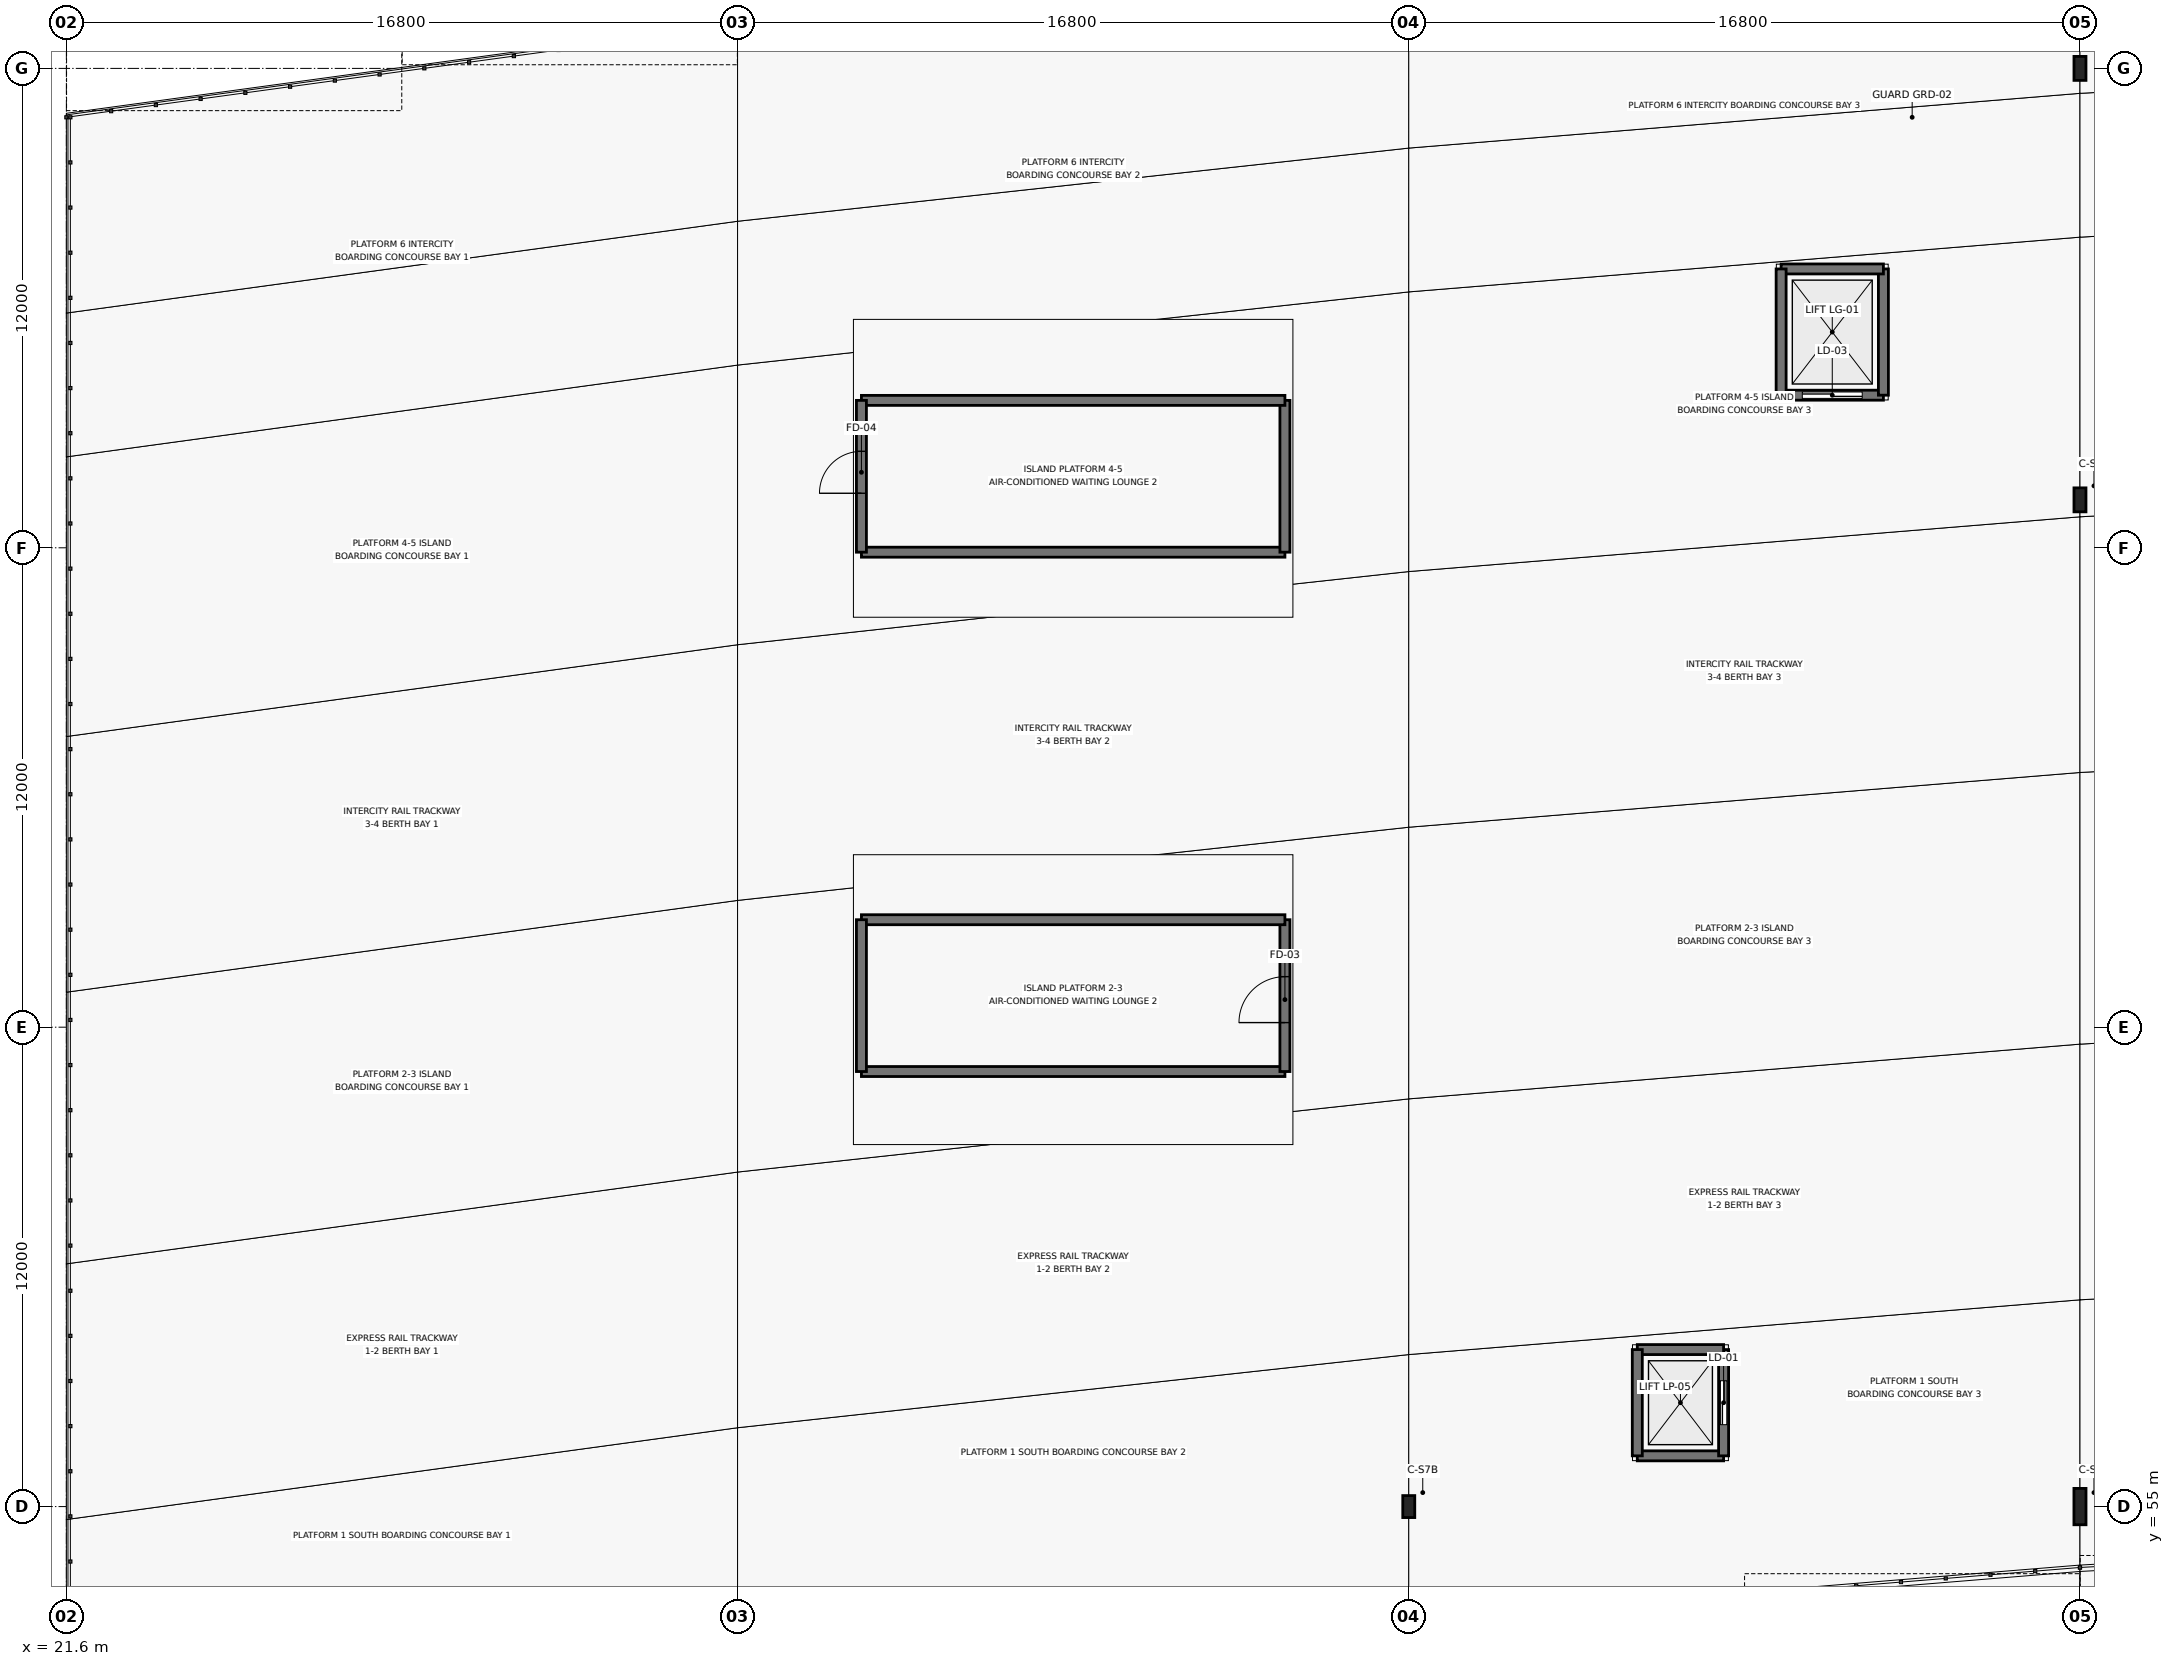
"""IFC4 building model, lengths in metres.
Left out: names, types, materials, properties, quantities, classifications, styles, units other than length and angle.
Written with IfcOpenShell. Run it as: python <this file> out.ifc"""

import sys

from ifc_helpers import new_model, si_unit, direction, frame, frame_2d, origin, origin_2d, place, context, subcontext, project, spatial, rectangle, i_section, extrude, element, fill, save


model = new_model("IFC4")
c1 = context("Model", 3, precision=1e-05, world=origin(), true_north=direction((0.0, 1.0)))
c2 = subcontext(c1, "Body", "Model", "MODEL_VIEW")
j1 = project(units=[si_unit("LENGTHUNIT", "METRE"), si_unit("PLANEANGLEUNIT", "RADIAN")], contexts=[c1])
p1 = place(None, origin())
s1 = spatial("IfcSite", under=j1, at=p1, CompositionType="ELEMENT")
p2 = place(p1, origin())
s2 = spatial("IfcBuilding", under=s1, at=p2, CompositionType="ELEMENT")
p3 = place(p2, frame((0.0, 0.0, 10.8)))
s3 = spatial("IfcBuildingStorey", under=s2, at=p3, CompositionType="ELEMENT", Elevation=10.8)
for number, where, z_axis, x_axis in (
    (1, (72.0, 80.2, 0.0), (0.0, 0.0, 1.0), (1.0, 0.0, 0.0)),
    (2, (72.0, 91.0, 0.0), (0.0, 0.0, 1.0), (1.0, 0.0, 0.0)),
):
    element("IfcColumn", number, at=place(p3, frame(where, z_axis=z_axis, x_axis=x_axis)), inside=s3, PredefinedType="COLUMN", context=c2, shape_type="SweptSolid", body=[
        extrude(i_section(OverallWidth=0.3, OverallDepth=0.6, WebThickness=0.015, FlangeThickness=0.03, FilletRadius=0.027, at=origin_2d()), origin(), (0.0, 0.0, 1.0), 6.0),
    ])
p4 = place(p3, frame((60.92, 56.27, 0.0), z_axis=(0.0, 0.0, 1.0), x_axis=(1.0, 0.0, 0.0)))
e3 = element("IfcWall", 3, at=p4, inside=s3, PredefinedType="SHEAR", context=c2, shape_type="SweptSolid", body=[
    extrude(rectangle(XDim=2.16, YDim=0.25, at=frame_2d((1.08, 0.0))), origin(), (0.0, 0.0, 1.0), 5.37),
])
p5 = place(p3, frame((63.08, 56.27, 0.0), z_axis=(0.0, 0.0, 1.0), x_axis=(0.0, 1.0, 0.0)))
e4 = element("IfcWall", 4, at=p5, inside=s3, PredefinedType="SHEAR", context=c2, shape_type="SweptSolid", body=[
    extrude(rectangle(XDim=2.66, YDim=0.25, at=frame_2d((1.33, 0.0))), origin(), (0.0, 0.0, 1.0), 5.37),
])
p6 = place(p5, frame((0.78, 0.0, 0.0)))
e5 = element("IfcOpeningElement", 5, at=p6, cuts=e4, PredefinedType="OPENING", context=c2, shape_type="SweptSolid", body=[
    extrude(rectangle(XDim=1.1, YDim=2.2, at=frame_2d((0.55, 1.1))), frame((0.0, 0.135, 0.0), z_axis=(0.0, -1.0, 0.0), x_axis=(1.0, 0.0, 0.0)), (0.0, 0.0, 1.0), 0.27),
])
p7 = place(p3, frame((63.08, 58.93, 0.0), z_axis=(0.0, 0.0, 1.0), x_axis=(-1.0, 0.0, 0.0)))
e6 = element("IfcWall", 6, at=p7, inside=s3, PredefinedType="SHEAR", context=c2, shape_type="SweptSolid", body=[
    extrude(rectangle(XDim=2.16, YDim=0.25, at=frame_2d((1.08, 0.0))), origin(), (0.0, 0.0, 1.0), 5.37),
])
p8 = place(p3, frame((60.92, 58.93, 0.0), z_axis=(0.0, 0.0, 1.0), x_axis=(0.0, -1.0, 0.0)))
e7 = element("IfcWall", 7, at=p8, inside=s3, PredefinedType="SHEAR", context=c2, shape_type="SweptSolid", body=[
    extrude(rectangle(XDim=2.66, YDim=0.25, at=frame_2d((1.33, 0.0))), origin(), (0.0, 0.0, 1.0), 5.37),
])
p9 = place(p3, frame((64.52, 82.82, 0.0), z_axis=(0.0, 0.0, 1.0), x_axis=(1.0, 0.0, 0.0)))
e8 = element("IfcWall", 8, at=p9, inside=s3, PredefinedType="SHEAR", context=c2, shape_type="SweptSolid", body=[
    extrude(rectangle(XDim=2.56, YDim=0.25, at=frame_2d((1.28, 0.0))), origin(), (0.0, 0.0, 1.0), 5.37),
])
p10 = place(p9, frame((0.53, 0.0, 0.0)))
e9 = element("IfcOpeningElement", 9, at=p10, cuts=e8, PredefinedType="OPENING", context=c2, shape_type="SweptSolid", body=[
    extrude(rectangle(XDim=1.5, YDim=2.3, at=frame_2d((0.75, 1.15))), frame((0.0, 0.135, 0.0), z_axis=(0.0, -1.0, 0.0), x_axis=(1.0, 0.0, 0.0)), (0.0, 0.0, 1.0), 0.27),
])
p11 = place(p3, frame((67.08, 82.82, 0.0), z_axis=(0.0, 0.0, 1.0), x_axis=(0.0, 1.0, 0.0)))
e10 = element("IfcWall", 10, at=p11, inside=s3, PredefinedType="SHEAR", context=c2, shape_type="SweptSolid", body=[
    extrude(rectangle(XDim=3.16, YDim=0.25, at=frame_2d((1.58, 0.0))), origin(), (0.0, 0.0, 1.0), 5.37),
])
p12 = place(p3, frame((67.08, 85.98, 0.0), z_axis=(0.0, 0.0, 1.0), x_axis=(-1.0, 0.0, 0.0)))
e11 = element("IfcWall", 11, at=p12, inside=s3, PredefinedType="SHEAR", context=c2, shape_type="SweptSolid", body=[
    extrude(rectangle(XDim=2.56, YDim=0.25, at=frame_2d((1.28, 0.0))), origin(), (0.0, 0.0, 1.0), 5.37),
])
p13 = place(p3, frame((64.52, 85.98, 0.0), z_axis=(0.0, 0.0, 1.0), x_axis=(0.0, -1.0, 0.0)))
e12 = element("IfcWall", 12, at=p13, inside=s3, PredefinedType="SHEAR", context=c2, shape_type="SweptSolid", body=[
    extrude(rectangle(XDim=3.16, YDim=0.25, at=frame_2d((1.58, 0.0))), origin(), (0.0, 0.0, 1.0), 5.37),
])
p14 = place(p3, frame((41.5, 65.89, 0.0), z_axis=(0.0, 0.0, 1.0), x_axis=(1.0, 0.0, 0.0)))
e13 = element("IfcWall", 13, at=p14, inside=s3, PredefinedType="SHEAR", context=c2, shape_type="SweptSolid", body=[
    extrude(rectangle(XDim=10.6, YDim=0.25, at=frame_2d((5.3, 0.0))), origin(), (0.0, 0.0, 1.0), 3.4),
])
p15 = place(p3, frame((52.1, 65.89, 0.0), z_axis=(0.0, 0.0, 1.0), x_axis=(0.0, 1.0, 0.0)))
e14 = element("IfcWall", 14, at=p15, inside=s3, PredefinedType="SHEAR", context=c2, shape_type="SweptSolid", body=[
    extrude(rectangle(XDim=3.8, YDim=0.25, at=frame_2d((1.9, 0.0))), origin(), (0.0, 0.0, 1.0), 3.4),
])
p16 = place(p15, frame((1.225, 0.0, 0.0)))
e15 = element("IfcOpeningElement", 15, at=p16, cuts=e14, PredefinedType="OPENING", context=c2, shape_type="SweptSolid", body=[
    extrude(rectangle(XDim=1.15, YDim=2.2, at=frame_2d((0.575, 1.1))), frame((0.0, 0.135, 0.0), z_axis=(0.0, -1.0, 0.0), x_axis=(1.0, 0.0, 0.0)), (0.0, 0.0, 1.0), 0.27),
])
p17 = place(p3, frame((52.1, 69.69, 0.0), z_axis=(0.0, 0.0, 1.0), x_axis=(-1.0, 0.0, 0.0)))
e16 = element("IfcWall", 16, at=p17, inside=s3, PredefinedType="SHEAR", context=c2, shape_type="SweptSolid", body=[
    extrude(rectangle(XDim=10.6, YDim=0.25, at=frame_2d((5.3, 0.0))), origin(), (0.0, 0.0, 1.0), 3.4),
])
p18 = place(p3, frame((41.5, 69.69, 0.0), z_axis=(0.0, 0.0, 1.0), x_axis=(0.0, -1.0, 0.0)))
e17 = element("IfcWall", 17, at=p18, inside=s3, PredefinedType="SHEAR", context=c2, shape_type="SweptSolid", body=[
    extrude(rectangle(XDim=3.8, YDim=0.25, at=frame_2d((1.9, 0.0))), origin(), (0.0, 0.0, 1.0), 3.4),
])
p19 = place(p3, frame((41.5, 78.89, 0.0), z_axis=(0.0, 0.0, 1.0), x_axis=(1.0, 0.0, 0.0)))
e18 = element("IfcWall", 18, at=p19, inside=s3, PredefinedType="SHEAR", context=c2, shape_type="SweptSolid", body=[
    extrude(rectangle(XDim=10.6, YDim=0.25, at=frame_2d((5.3, 0.0))), origin(), (0.0, 0.0, 1.0), 3.4),
])
p20 = place(p3, frame((52.1, 78.89, 0.0), z_axis=(0.0, 0.0, 1.0), x_axis=(0.0, 1.0, 0.0)))
e19 = element("IfcWall", 19, at=p20, inside=s3, PredefinedType="SHEAR", context=c2, shape_type="SweptSolid", body=[
    extrude(rectangle(XDim=3.8, YDim=0.25, at=frame_2d((1.9, 0.0))), origin(), (0.0, 0.0, 1.0), 3.4),
])
p21 = place(p3, frame((52.1, 82.69, 0.0), z_axis=(0.0, 0.0, 1.0), x_axis=(-1.0, 0.0, 0.0)))
e20 = element("IfcWall", 20, at=p21, inside=s3, PredefinedType="SHEAR", context=c2, shape_type="SweptSolid", body=[
    extrude(rectangle(XDim=10.6, YDim=0.25, at=frame_2d((5.3, 0.0))), origin(), (0.0, 0.0, 1.0), 3.4),
])
p22 = place(p3, frame((41.5, 82.69, 0.0), z_axis=(0.0, 0.0, 1.0), x_axis=(0.0, -1.0, 0.0)))
e21 = element("IfcWall", 21, at=p22, inside=s3, PredefinedType="SHEAR", context=c2, shape_type="SweptSolid", body=[
    extrude(rectangle(XDim=3.8, YDim=0.25, at=frame_2d((1.9, 0.0))), origin(), (0.0, 0.0, 1.0), 3.4),
])
p23 = place(p22, frame((1.275, 0.0, 0.0)))
e22 = element("IfcOpeningElement", 22, at=p23, cuts=e21, PredefinedType="OPENING", context=c2, shape_type="SweptSolid", body=[
    extrude(rectangle(XDim=1.05, YDim=2.15, at=frame_2d((0.525, 1.075))), frame((0.0, 0.135, 0.0), z_axis=(0.0, -1.0, 0.0), x_axis=(1.0, 0.0, 0.0)), (0.0, 0.0, 1.0), 0.27),
])
p24 = place(p6, origin())
e23 = element("IfcDoor", 23, at=p24, inside=s3, OperationType="SLIDING_TO_RIGHT", PredefinedType="DOOR", context=c2, shape_type="SweptSolid", body=[
    extrude(rectangle(XDim=1.1, YDim=2.2, at=frame_2d((0.55, 1.1))), frame((0.0, 0.025, 0.0), z_axis=(0.0, -1.0, 0.0), x_axis=(1.0, 0.0, 0.0)), (0.0, 0.0, 1.0), 0.05),
])
fill(e5, e23)
p25 = place(p10, origin())
e24 = element("IfcDoor", 24, at=p25, inside=s3, OperationType="SLIDING_TO_RIGHT", PredefinedType="DOOR", context=c2, shape_type="SweptSolid", body=[
    extrude(rectangle(XDim=1.5, YDim=2.3, at=frame_2d((0.75, 1.15))), frame((0.0, 0.025, 0.0), z_axis=(0.0, -1.0, 0.0), x_axis=(1.0, 0.0, 0.0)), (0.0, 0.0, 1.0), 0.05),
])
fill(e9, e24)
p26 = place(p16, origin())
e25 = element("IfcDoor", 25, at=p26, inside=s3, OperationType="SINGLE_SWING_LEFT", PredefinedType="DOOR", context=c2, shape_type="SweptSolid", body=[
    extrude(rectangle(XDim=1.15, YDim=2.2, at=frame_2d((0.575, 1.1))), frame((0.0, 0.025, 0.0), z_axis=(0.0, -1.0, 0.0), x_axis=(1.0, 0.0, 0.0)), (0.0, 0.0, 1.0), 0.05),
])
fill(e15, e25)
p27 = place(p23, origin())
e26 = element("IfcDoor", 26, at=p27, inside=s3, OperationType="SINGLE_SWING_RIGHT", PredefinedType="DOOR", context=c2, shape_type="SweptSolid", body=[
    extrude(rectangle(XDim=1.05, YDim=2.15, at=frame_2d((0.525, 1.075))), frame((0.0, 0.025, 0.0), z_axis=(0.0, -1.0, 0.0), x_axis=(1.0, 0.0, 0.0)), (0.0, 0.0, 1.0), 0.05),
])
fill(e22, e26)
save(model, sys.argv[1])
